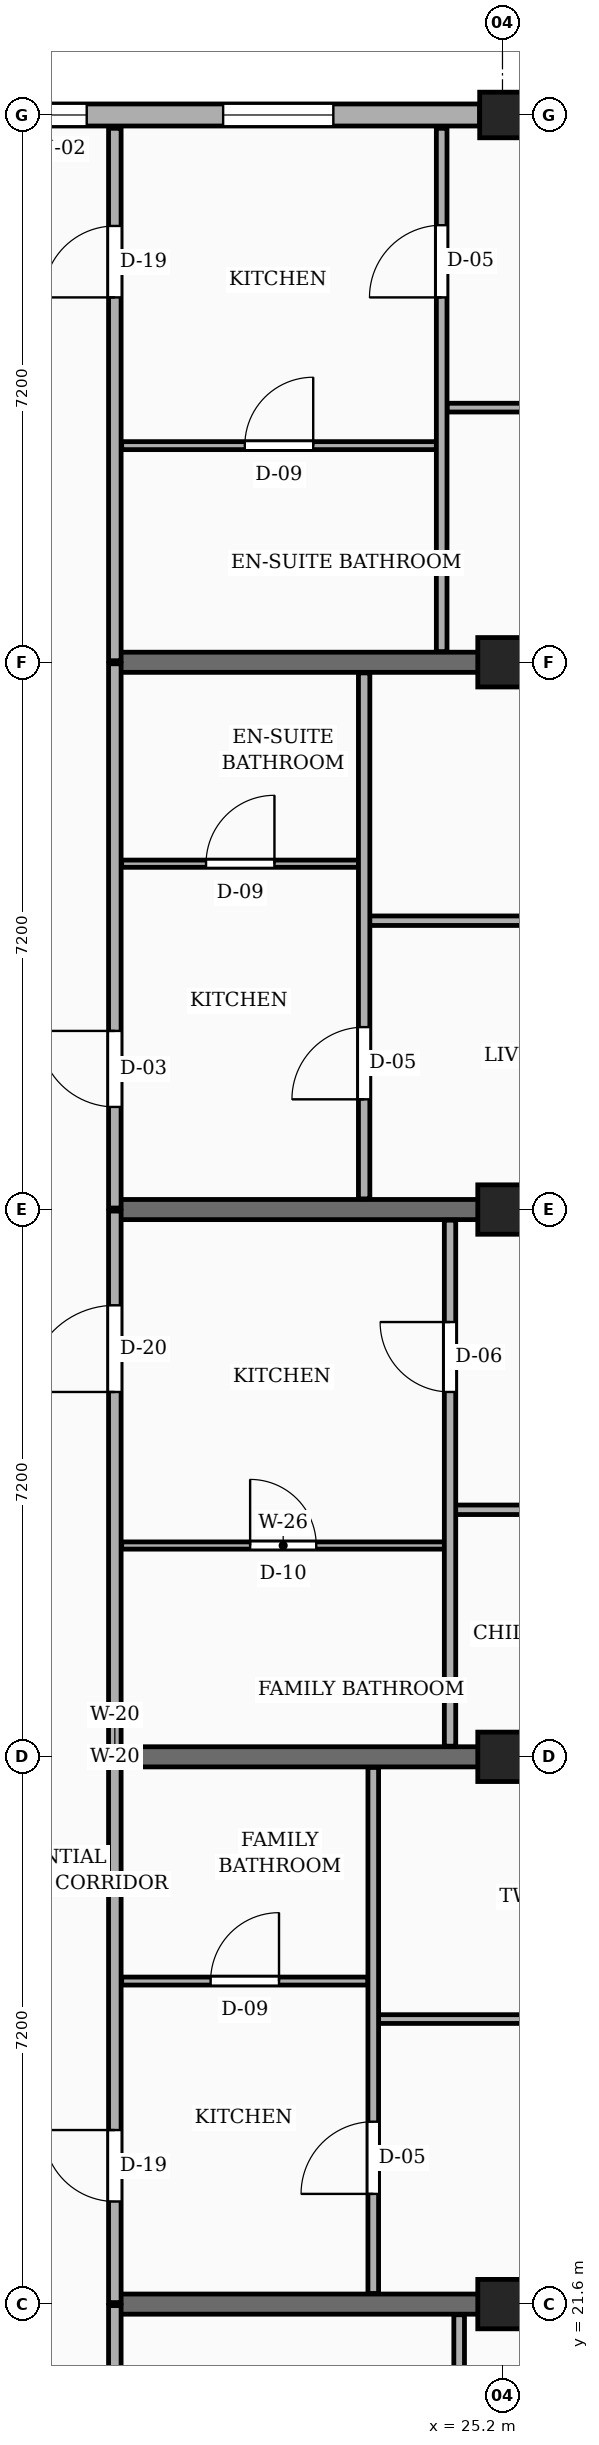
"""IFC4 building model, lengths in metres.
Left out: names, types, materials, properties, quantities, classifications, styles, units other than length and angle.
Written with IfcOpenShell. Run it as: python <this file> out.ifc"""

import sys

from ifc_helpers import new_model, si_unit, direction, frame, frame_2d, origin, origin_2d, place, context, subcontext, project, spatial, rectangle, extrude, element, fill, save


model = new_model("IFC4")
c1 = context("Model", 3, precision=1e-05, world=origin(), true_north=direction((0.0, 1.0)))
c2 = subcontext(c1, "Body", "Model", "MODEL_VIEW")
j1 = project(units=[si_unit("LENGTHUNIT", "METRE"), si_unit("PLANEANGLEUNIT", "RADIAN")], contexts=[c1])
p1 = place(None, origin())
s1 = spatial("IfcSite", under=j1, at=p1, CompositionType="ELEMENT")
p2 = place(p1, origin())
s2 = spatial("IfcBuilding", under=s1, at=p2, CompositionType="ELEMENT")
p3 = place(p2, frame((0.0, 0.0, 4.5)))
s3 = spatial("IfcBuildingStorey", under=s2, at=p3, CompositionType="ELEMENT", Elevation=4.5)
for number, where, z_axis, x_axis in (
    (1, (25.2, 21.6, 0.0), (0.0, 0.0, 1.0), (1.0, 0.0, 0.0)),
    (2, (25.2, 28.8, 0.0), (0.0, 0.0, 1.0), (1.0, 0.0, 0.0)),
    (3, (25.2, 36.0, 0.0), (0.0, 0.0, 1.0), (1.0, 0.0, 0.0)),
    (4, (25.2, 43.2, 0.0), (0.0, 0.0, 1.0), (1.0, 0.0, 0.0)),
):
    element("IfcColumn", number, at=place(p3, frame(where, z_axis=z_axis, x_axis=x_axis)), inside=s3, PredefinedType="COLUMN", context=c2, shape_type="SweptSolid", body=[
        extrude(rectangle(XDim=0.65, YDim=0.65, at=origin_2d()), origin(), (0.0, 0.0, 1.0), 3.15),
    ])
p4 = place(p3, frame((25.2, 50.4, 0.0), z_axis=(0.0, 0.0, 1.0), x_axis=(1.0, 0.0, 0.0)))
e5 = element("IfcColumn", 5, at=p4, inside=s3, PredefinedType="COLUMN", context=c2, shape_type="SweptSolid", body=[
    extrude(rectangle(XDim=0.6, YDim=0.6, at=origin_2d()), origin(), (0.0, 0.0, 1.0), 3.15),
])
for number, where, z_axis, x_axis in (
    (6, (20.1, 21.6, 0.0), (0.0, 0.0, 1.0), (1.0, 0.0, 0.0)),
    (7, (20.1, 28.8, 0.0), (0.0, 0.0, 1.0), (1.0, 0.0, 0.0)),
    (8, (20.1, 36.0, 0.0), (0.0, 0.0, 1.0), (1.0, 0.0, 0.0)),
    (9, (20.1, 43.2, 0.0), (0.0, 0.0, 1.0), (1.0, 0.0, 0.0)),
):
    element("IfcWall", number, at=place(p3, frame(where, z_axis=z_axis, x_axis=x_axis)), inside=s3, PredefinedType="SOLIDWALL", context=c2, shape_type="SweptSolid", body=[
        extrude(rectangle(XDim=12.0, YDim=0.265, at=frame_2d((6.0, 0.0))), origin(), (0.0, 0.0, 1.0), 2.17),
    ])
p5 = place(p3, frame((24.9, 50.4, 0.0), z_axis=(0.0, 0.0, 1.0), x_axis=(-1.0, 0.0, 0.0)))
e10 = element("IfcWall", 10, at=p5, inside=s3, PredefinedType="SOLIDWALL", context=c2, shape_type="SweptSolid", body=[
    extrude(rectangle(XDim=6.6, YDim=0.29, at=frame_2d((3.3, 0.0))), origin(), (0.0, 0.0, 1.0), 2.44),
])
p6 = place(p5, frame((1.925, 0.0, 0.78)))
e11 = element("IfcOpeningElement", 11, at=p6, cuts=e10, PredefinedType="OPENING", context=c2, shape_type="SweptSolid", body=[
    extrude(rectangle(XDim=1.45, YDim=1.44, at=frame_2d((0.725, 0.72))), frame((0.0, 0.155, 0.0), z_axis=(0.0, -1.0, 0.0), x_axis=(1.0, 0.0, 0.0)), (0.0, 0.0, 1.0), 0.31),
])
p7 = place(p5, frame((5.17, 0.0, 0.78)))
e12 = element("IfcOpeningElement", 12, at=p7, cuts=e10, PredefinedType="OPENING", context=c2, shape_type="SweptSolid", body=[
    extrude(rectangle(XDim=0.92, YDim=1.15, at=frame_2d((0.46, 0.575))), frame((0.0, 0.155, 0.0), z_axis=(0.0, -1.0, 0.0), x_axis=(1.0, 0.0, 0.0)), (0.0, 0.0, 1.0), 0.31),
])
p8 = place(p3, frame((20.1, 14.42, 0.0), z_axis=(0.0, 0.0, 1.0), x_axis=(0.0, 1.0, 0.0)))
e13 = element("IfcWall", 13, at=p8, inside=s3, PredefinedType="PARTITIONING", context=c2, shape_type="SweptSolid", body=[
    extrude(rectangle(XDim=7.16, YDim=0.165, at=frame_2d((3.58, 0.0))), origin(), (0.0, 0.0, 1.0), 2.305),
])
p9 = place(p8, frame((4.78, 0.0, 0.0)))
e14 = element("IfcOpeningElement", 14, at=p9, cuts=e13, PredefinedType="OPENING", context=c2, shape_type="SweptSolid", body=[
    extrude(rectangle(XDim=1.0, YDim=2.15, at=frame_2d((0.5, 1.075))), frame((0.0, 0.093, 0.0), z_axis=(0.0, -1.0, 0.0), x_axis=(1.0, 0.0, 0.0)), (0.0, 0.0, 1.0), 0.185),
])
p10 = place(p3, frame((20.1, 21.62, 0.0), z_axis=(0.0, 0.0, 1.0), x_axis=(0.0, 1.0, 0.0)))
e15 = element("IfcWall", 15, at=p10, inside=s3, PredefinedType="PARTITIONING", context=c2, shape_type="SweptSolid", body=[
    extrude(rectangle(XDim=7.16, YDim=0.165, at=frame_2d((3.58, 0.0))), origin(), (0.0, 0.0, 1.0), 2.305),
])
p11 = place(p10, frame((1.33, 0.0, 0.0)))
e16 = element("IfcOpeningElement", 16, at=p11, cuts=e15, PredefinedType="OPENING", context=c2, shape_type="SweptSolid", body=[
    extrude(rectangle(XDim=0.94, YDim=2.12, at=frame_2d((0.47, 1.06))), frame((0.0, 0.093, 0.0), z_axis=(0.0, -1.0, 0.0), x_axis=(1.0, 0.0, 0.0)), (0.0, 0.0, 1.0), 0.185),
])
p12 = place(p3, frame((20.1, 28.82, 0.0), z_axis=(0.0, 0.0, 1.0), x_axis=(0.0, 1.0, 0.0)))
e17 = element("IfcWall", 17, at=p12, inside=s3, PredefinedType="PARTITIONING", context=c2, shape_type="SweptSolid", body=[
    extrude(rectangle(XDim=7.16, YDim=0.165, at=frame_2d((3.58, 0.0))), origin(), (0.0, 0.0, 1.0), 2.305),
])
p13 = place(p12, frame((4.78, 0.0, 0.0)))
e18 = element("IfcOpeningElement", 18, at=p13, cuts=e17, PredefinedType="OPENING", context=c2, shape_type="SweptSolid", body=[
    extrude(rectangle(XDim=1.14, YDim=2.18, at=frame_2d((0.57, 1.09))), frame((0.0, 0.093, 0.0), z_axis=(0.0, -1.0, 0.0), x_axis=(1.0, 0.0, 0.0)), (0.0, 0.0, 1.0), 0.185),
])
p14 = place(p3, frame((20.1, 36.02, 0.0), z_axis=(0.0, 0.0, 1.0), x_axis=(0.0, 1.0, 0.0)))
e19 = element("IfcWall", 19, at=p14, inside=s3, PredefinedType="PARTITIONING", context=c2, shape_type="SweptSolid", body=[
    extrude(rectangle(XDim=7.16, YDim=0.165, at=frame_2d((3.58, 0.0))), origin(), (0.0, 0.0, 1.0), 2.305),
])
p15 = place(p14, frame((1.33, 0.0, 0.0)))
e20 = element("IfcOpeningElement", 20, at=p15, cuts=e19, PredefinedType="OPENING", context=c2, shape_type="SweptSolid", body=[
    extrude(rectangle(XDim=1.0, YDim=2.15, at=frame_2d((0.5, 1.075))), frame((0.0, 0.093, 0.0), z_axis=(0.0, -1.0, 0.0), x_axis=(1.0, 0.0, 0.0)), (0.0, 0.0, 1.0), 0.185),
])
p16 = place(p3, frame((20.1, 43.22, 0.0), z_axis=(0.0, 0.0, 1.0), x_axis=(0.0, 1.0, 0.0)))
e21 = element("IfcWall", 21, at=p16, inside=s3, PredefinedType="PARTITIONING", context=c2, shape_type="SweptSolid", body=[
    extrude(rectangle(XDim=7.005, YDim=0.165, at=frame_2d((3.502, 0.0))), origin(), (0.0, 0.0, 1.0), 2.305),
])
p17 = place(p16, frame((4.78, 0.0, 0.0)))
e22 = element("IfcOpeningElement", 22, at=p17, cuts=e21, PredefinedType="OPENING", context=c2, shape_type="SweptSolid", body=[
    extrude(rectangle(XDim=0.94, YDim=2.12, at=frame_2d((0.47, 1.06))), frame((0.0, 0.093, 0.0), z_axis=(0.0, -1.0, 0.0), x_axis=(1.0, 0.0, 0.0)), (0.0, 0.0, 1.0), 0.185),
])
p18 = place(p3, frame((24.63, 14.54, 0.0), z_axis=(0.0, 0.0, 1.0), x_axis=(0.0, 1.0, 0.0)))
e23 = element("IfcWall", 23, at=p18, inside=s3, PredefinedType="PARTITIONING", context=c2, shape_type="SweptSolid", body=[
    extrude(rectangle(XDim=6.92, YDim=0.14, at=frame_2d((3.46, 0.0))), origin(), (0.0, 0.0, 1.0), 2.305),
])
p19 = place(p18, frame((4.66, 0.0, 0.0)))
e24 = element("IfcOpeningElement", 24, at=p19, cuts=e23, PredefinedType="OPENING", context=c2, shape_type="SweptSolid", body=[
    extrude(rectangle(XDim=0.92, YDim=2.1, at=frame_2d((0.46, 1.05))), frame((0.0, 0.08, 0.0), z_axis=(0.0, -1.0, 0.0), x_axis=(1.0, 0.0, 0.0)), (0.0, 0.0, 1.0), 0.16),
])
p20 = place(p3, frame((23.57, 25.35, 0.0), z_axis=(0.0, 0.0, 1.0), x_axis=(1.0, 0.0, 0.0)))
e25 = element("IfcWall", 25, at=p20, inside=s3, PredefinedType="PARTITIONING", context=c2, shape_type="SweptSolid", body=[
    extrude(rectangle(XDim=8.655, YDim=0.115, at=frame_2d((4.328, 0.0))), origin(), (0.0, 0.0, 1.0), 2.305),
])
p21 = place(p20, frame((3.877, 0.0, 0.0)))
e26 = element("IfcOpeningElement", 26, at=p21, cuts=e25, PredefinedType="OPENING", context=c2, shape_type="SweptSolid", body=[
    extrude(rectangle(XDim=0.9, YDim=2.1, at=frame_2d((0.45, 1.05))), frame((0.0, 0.067, 0.0), z_axis=(0.0, -1.0, 0.0), x_axis=(1.0, 0.0, 0.0)), (0.0, 0.0, 1.0), 0.135),
])
p22 = place(p3, frame((20.19, 25.85, 0.0), z_axis=(0.0, 0.0, 1.0), x_axis=(1.0, 0.0, 0.0)))
e27 = element("IfcWall", 27, at=p22, inside=s3, PredefinedType="PARTITIONING", context=c2, shape_type="SweptSolid", body=[
    extrude(rectangle(XDim=3.24, YDim=0.105, at=frame_2d((1.62, 0.0))), origin(), (0.0, 0.0, 1.0), 2.305),
])
p23 = place(p22, frame((1.17, 0.0, 0.0)))
e28 = element("IfcOpeningElement", 28, at=p23, cuts=e27, PredefinedType="OPENING", context=c2, shape_type="SweptSolid", body=[
    extrude(rectangle(XDim=0.9, YDim=2.05, at=frame_2d((0.45, 1.025))), frame((0.0, 0.062, 0.0), z_axis=(0.0, -1.0, 0.0), x_axis=(1.0, 0.0, 0.0)), (0.0, 0.0, 1.0), 0.125),
])
p24 = place(p3, frame((23.5, 21.74, 0.0), z_axis=(0.0, 0.0, 1.0), x_axis=(0.0, 1.0, 0.0)))
e29 = element("IfcWall", 29, at=p24, inside=s3, PredefinedType="PARTITIONING", context=c2, shape_type="SweptSolid", body=[
    extrude(rectangle(XDim=6.92, YDim=0.14, at=frame_2d((3.46, 0.0))), origin(), (0.0, 0.0, 1.0), 2.305),
])
p25 = place(p24, frame((1.31, 0.0, 0.0)))
e30 = element("IfcOpeningElement", 30, at=p25, cuts=e29, PredefinedType="OPENING", context=c2, shape_type="SweptSolid", body=[
    extrude(rectangle(XDim=0.95, YDim=2.1, at=frame_2d((0.475, 1.05))), frame((0.0, 0.08, 0.0), z_axis=(0.0, -1.0, 0.0), x_axis=(1.0, 0.0, 0.0)), (0.0, 0.0, 1.0), 0.16),
])
p26 = place(p3, frame((24.58, 32.05, 0.0), z_axis=(0.0, 0.0, 1.0), x_axis=(1.0, 0.0, 0.0)))
e31 = element("IfcWall", 31, at=p26, inside=s3, PredefinedType="PARTITIONING", context=c2, shape_type="SweptSolid", body=[
    extrude(rectangle(XDim=7.645, YDim=0.125, at=frame_2d((3.823, 0.0))), origin(), (0.0, 0.0, 1.0), 2.305),
])
p27 = place(p26, frame((3.383, 0.0, 0.0)))
e32 = element("IfcOpeningElement", 32, at=p27, cuts=e31, PredefinedType="OPENING", context=c2, shape_type="SweptSolid", body=[
    extrude(rectangle(XDim=0.88, YDim=2.08, at=frame_2d((0.44, 1.04))), frame((0.0, 0.073, 0.0), z_axis=(0.0, -1.0, 0.0), x_axis=(1.0, 0.0, 0.0)), (0.0, 0.0, 1.0), 0.145),
])
p28 = place(p3, frame((20.19, 31.58, 0.0), z_axis=(0.0, 0.0, 1.0), x_axis=(1.0, 0.0, 0.0)))
e33 = element("IfcWall", 33, at=p28, inside=s3, PredefinedType="PARTITIONING", context=c2, shape_type="SweptSolid", body=[
    extrude(rectangle(XDim=4.25, YDim=0.095, at=frame_2d((2.125, 0.0))), origin(), (0.0, 0.0, 1.0), 2.305),
])
p29 = place(p28, frame((1.69, 0.0, 0.0)))
e34 = element("IfcOpeningElement", 34, at=p29, cuts=e33, PredefinedType="OPENING", context=c2, shape_type="SweptSolid", body=[
    extrude(rectangle(XDim=0.87, YDim=2.05, at=frame_2d((0.435, 1.025))), frame((0.0, 0.058, 0.0), z_axis=(0.0, -1.0, 0.0), x_axis=(1.0, 0.0, 0.0)), (0.0, 0.0, 1.0), 0.115),
])
p30 = place(p3, frame((24.51, 28.94, 0.0), z_axis=(0.0, 0.0, 1.0), x_axis=(0.0, 1.0, 0.0)))
e35 = element("IfcWall", 35, at=p30, inside=s3, PredefinedType="PARTITIONING", context=c2, shape_type="SweptSolid", body=[
    extrude(rectangle(XDim=6.92, YDim=0.15, at=frame_2d((3.46, 0.0))), origin(), (0.0, 0.0, 1.0), 2.305),
])
p31 = place(p30, frame((4.66, 0.0, 0.0)))
e36 = element("IfcOpeningElement", 36, at=p31, cuts=e35, PredefinedType="OPENING", context=c2, shape_type="SweptSolid", body=[
    extrude(rectangle(XDim=0.92, YDim=2.1, at=frame_2d((0.46, 1.05))), frame((0.0, 0.085, 0.0), z_axis=(0.0, -1.0, 0.0), x_axis=(1.0, 0.0, 0.0)), (0.0, 0.0, 1.0), 0.17),
])
p32 = place(p3, frame((23.45, 39.8, 0.0), z_axis=(0.0, 0.0, 1.0), x_axis=(1.0, 0.0, 0.0)))
e37 = element("IfcWall", 37, at=p32, inside=s3, PredefinedType="PARTITIONING", context=c2, shape_type="SweptSolid", body=[
    extrude(rectangle(XDim=8.775, YDim=0.125, at=frame_2d((4.388, 0.0))), origin(), (0.0, 0.0, 1.0), 2.305),
])
p33 = place(p32, frame((3.938, 0.0, 0.0)))
e38 = element("IfcOpeningElement", 38, at=p33, cuts=e37, PredefinedType="OPENING", context=c2, shape_type="SweptSolid", body=[
    extrude(rectangle(XDim=0.9, YDim=2.1, at=frame_2d((0.45, 1.05))), frame((0.0, 0.073, 0.0), z_axis=(0.0, -1.0, 0.0), x_axis=(1.0, 0.0, 0.0)), (0.0, 0.0, 1.0), 0.145),
])
p34 = place(p3, frame((20.19, 40.55, 0.0), z_axis=(0.0, 0.0, 1.0), x_axis=(1.0, 0.0, 0.0)))
e39 = element("IfcWall", 39, at=p34, inside=s3, PredefinedType="PARTITIONING", context=c2, shape_type="SweptSolid", body=[
    extrude(rectangle(XDim=3.12, YDim=0.095, at=frame_2d((1.56, 0.0))), origin(), (0.0, 0.0, 1.0), 2.305),
])
p35 = place(p34, frame((1.11, 0.0, 0.0)))
e40 = element("IfcOpeningElement", 40, at=p35, cuts=e39, PredefinedType="OPENING", context=c2, shape_type="SweptSolid", body=[
    extrude(rectangle(XDim=0.9, YDim=2.05, at=frame_2d((0.45, 1.025))), frame((0.0, 0.058, 0.0), z_axis=(0.0, -1.0, 0.0), x_axis=(1.0, 0.0, 0.0)), (0.0, 0.0, 1.0), 0.115),
])
p36 = place(p3, frame((23.38, 36.14, 0.0), z_axis=(0.0, 0.0, 1.0), x_axis=(0.0, 1.0, 0.0)))
e41 = element("IfcWall", 41, at=p36, inside=s3, PredefinedType="PARTITIONING", context=c2, shape_type="SweptSolid", body=[
    extrude(rectangle(XDim=6.92, YDim=0.15, at=frame_2d((3.46, 0.0))), origin(), (0.0, 0.0, 1.0), 2.305),
])
p37 = place(p36, frame((1.31, 0.0, 0.0)))
e42 = element("IfcOpeningElement", 42, at=p37, cuts=e41, PredefinedType="OPENING", context=c2, shape_type="SweptSolid", body=[
    extrude(rectangle(XDim=0.95, YDim=2.1, at=frame_2d((0.475, 1.05))), frame((0.0, 0.085, 0.0), z_axis=(0.0, -1.0, 0.0), x_axis=(1.0, 0.0, 0.0)), (0.0, 0.0, 1.0), 0.17),
])
p38 = place(p3, frame((24.47, 46.55, 0.0), z_axis=(0.0, 0.0, 1.0), x_axis=(1.0, 0.0, 0.0)))
e43 = element("IfcWall", 43, at=p38, inside=s3, PredefinedType="PARTITIONING", context=c2, shape_type="SweptSolid", body=[
    extrude(rectangle(XDim=7.755, YDim=0.115, at=frame_2d((3.877, 0.0))), origin(), (0.0, 0.0, 1.0), 2.305),
])
p39 = place(p38, frame((3.427, 0.0, 0.0)))
e44 = element("IfcOpeningElement", 44, at=p39, cuts=e43, PredefinedType="OPENING", context=c2, shape_type="SweptSolid", body=[
    extrude(rectangle(XDim=0.9, YDim=2.1, at=frame_2d((0.45, 1.05))), frame((0.0, 0.067, 0.0), z_axis=(0.0, -1.0, 0.0), x_axis=(1.0, 0.0, 0.0)), (0.0, 0.0, 1.0), 0.135),
])
p40 = place(p3, frame((20.19, 46.05, 0.0), z_axis=(0.0, 0.0, 1.0), x_axis=(1.0, 0.0, 0.0)))
e45 = element("IfcWall", 45, at=p40, inside=s3, PredefinedType="PARTITIONING", context=c2, shape_type="SweptSolid", body=[
    extrude(rectangle(XDim=4.14, YDim=0.105, at=frame_2d((2.07, 0.0))), origin(), (0.0, 0.0, 1.0), 2.305),
])
p41 = place(p40, frame((1.62, 0.0, 0.0)))
e46 = element("IfcOpeningElement", 46, at=p41, cuts=e45, PredefinedType="OPENING", context=c2, shape_type="SweptSolid", body=[
    extrude(rectangle(XDim=0.9, YDim=2.05, at=frame_2d((0.45, 1.025))), frame((0.0, 0.062, 0.0), z_axis=(0.0, -1.0, 0.0), x_axis=(1.0, 0.0, 0.0)), (0.0, 0.0, 1.0), 0.125),
])
p42 = place(p3, frame((24.4, 43.34, 0.0), z_axis=(0.0, 0.0, 1.0), x_axis=(0.0, 1.0, 0.0)))
e47 = element("IfcWall", 47, at=p42, inside=s3, PredefinedType="PARTITIONING", context=c2, shape_type="SweptSolid", body=[
    extrude(rectangle(XDim=6.885, YDim=0.14, at=frame_2d((3.442, 0.0))), origin(), (0.0, 0.0, 1.0), 2.305),
])
p43 = place(p42, frame((4.66, 0.0, 0.0)))
e48 = element("IfcOpeningElement", 48, at=p43, cuts=e47, PredefinedType="OPENING", context=c2, shape_type="SweptSolid", body=[
    extrude(rectangle(XDim=0.95, YDim=2.1, at=frame_2d((0.475, 1.05))), frame((0.0, 0.08, 0.0), z_axis=(0.0, -1.0, 0.0), x_axis=(1.0, 0.0, 0.0)), (0.0, 0.0, 1.0), 0.16),
])
p44 = place(p6, origin())
e49 = element("IfcWindow", 49, at=p44, inside=s3, PartitioningType="SINGLE_PANEL", PredefinedType="WINDOW", context=c2, shape_type="SweptSolid", body=[
    extrude(rectangle(XDim=1.45, YDim=1.44, at=frame_2d((0.725, 0.72))), frame((0.0, 0.03, 0.0), z_axis=(0.0, -1.0, 0.0), x_axis=(1.0, 0.0, 0.0)), (0.0, 0.0, 1.0), 0.06),
])
fill(e11, e49)
p45 = place(p7, origin())
e50 = element("IfcWindow", 50, at=p45, inside=s3, PartitioningType="SINGLE_PANEL", PredefinedType="WINDOW", context=c2, shape_type="SweptSolid", body=[
    extrude(rectangle(XDim=0.92, YDim=1.15, at=frame_2d((0.46, 0.575))), frame((0.0, 0.03, 0.0), z_axis=(0.0, -1.0, 0.0), x_axis=(1.0, 0.0, 0.0)), (0.0, 0.0, 1.0), 0.06),
])
fill(e12, e50)
p46 = place(p11, origin())
e51 = element("IfcDoor", 51, at=p46, inside=s3, OperationType="SINGLE_SWING_RIGHT", PredefinedType="DOOR", context=c2, shape_type="SweptSolid", body=[
    extrude(rectangle(XDim=0.94, YDim=2.12, at=frame_2d((0.47, 1.06))), frame((0.0, 0.025, 0.0), z_axis=(0.0, -1.0, 0.0), x_axis=(1.0, 0.0, 0.0)), (0.0, 0.0, 1.0), 0.05),
])
fill(e16, e51)
p47 = place(p13, origin())
e52 = element("IfcDoor", 52, at=p47, inside=s3, OperationType="SINGLE_SWING_LEFT", PredefinedType="DOOR", context=c2, shape_type="SweptSolid", body=[
    extrude(rectangle(XDim=1.14, YDim=2.18, at=frame_2d((0.57, 1.09))), frame((0.0, 0.025, 0.0), z_axis=(0.0, -1.0, 0.0), x_axis=(1.0, 0.0, 0.0)), (0.0, 0.0, 1.0), 0.05),
])
fill(e18, e52)
p48 = place(p15, origin())
e53 = element("IfcDoor", 53, at=p48, inside=s3, OperationType="SINGLE_SWING_RIGHT", PredefinedType="DOOR", context=c2, shape_type="SweptSolid", body=[
    extrude(rectangle(XDim=1.0, YDim=2.15, at=frame_2d((0.5, 1.075))), frame((0.0, 0.025, 0.0), z_axis=(0.0, -1.0, 0.0), x_axis=(1.0, 0.0, 0.0)), (0.0, 0.0, 1.0), 0.05),
])
fill(e20, e53)
p49 = place(p17, origin())
e54 = element("IfcDoor", 54, at=p49, inside=s3, OperationType="SINGLE_SWING_LEFT", PredefinedType="DOOR", context=c2, shape_type="SweptSolid", body=[
    extrude(rectangle(XDim=0.94, YDim=2.12, at=frame_2d((0.47, 1.06))), frame((0.0, 0.025, 0.0), z_axis=(0.0, -1.0, 0.0), x_axis=(1.0, 0.0, 0.0)), (0.0, 0.0, 1.0), 0.05),
])
fill(e22, e54)
p50 = place(p23, origin())
e55 = element("IfcDoor", 55, at=p50, inside=s3, OperationType="SINGLE_SWING_RIGHT", PredefinedType="DOOR", context=c2, shape_type="SweptSolid", body=[
    extrude(rectangle(XDim=0.9, YDim=2.05, at=frame_2d((0.45, 1.025))), frame((0.0, 0.025, 0.0), z_axis=(0.0, -1.0, 0.0), x_axis=(1.0, 0.0, 0.0)), (0.0, 0.0, 1.0), 0.05),
])
fill(e28, e55)
p51 = place(p25, origin())
e56 = element("IfcDoor", 56, at=p51, inside=s3, OperationType="SINGLE_SWING_LEFT", PredefinedType="DOOR", context=c2, shape_type="SweptSolid", body=[
    extrude(rectangle(XDim=0.95, YDim=2.1, at=frame_2d((0.475, 1.05))), frame((0.0, 0.025, 0.0), z_axis=(0.0, -1.0, 0.0), x_axis=(1.0, 0.0, 0.0)), (0.0, 0.0, 1.0), 0.05),
])
fill(e30, e56)
p52 = place(p29, origin())
e57 = element("IfcDoor", 57, at=p52, inside=s3, OperationType="SINGLE_SWING_LEFT", PredefinedType="DOOR", context=c2, shape_type="SweptSolid", body=[
    extrude(rectangle(XDim=0.87, YDim=2.05, at=frame_2d((0.435, 1.025))), frame((0.0, 0.025, 0.0), z_axis=(0.0, -1.0, 0.0), x_axis=(1.0, 0.0, 0.0)), (0.0, 0.0, 1.0), 0.05),
])
fill(e34, e57)
p53 = place(p31, origin())
e58 = element("IfcDoor", 58, at=p53, inside=s3, OperationType="SINGLE_SWING_RIGHT", PredefinedType="DOOR", context=c2, shape_type="SweptSolid", body=[
    extrude(rectangle(XDim=0.92, YDim=2.1, at=frame_2d((0.46, 1.05))), frame((0.0, 0.025, 0.0), z_axis=(0.0, -1.0, 0.0), x_axis=(1.0, 0.0, 0.0)), (0.0, 0.0, 1.0), 0.05),
])
fill(e36, e58)
p54 = place(p35, origin())
e59 = element("IfcDoor", 59, at=p54, inside=s3, OperationType="SINGLE_SWING_RIGHT", PredefinedType="DOOR", context=c2, shape_type="SweptSolid", body=[
    extrude(rectangle(XDim=0.9, YDim=2.05, at=frame_2d((0.45, 1.025))), frame((0.0, 0.025, 0.0), z_axis=(0.0, -1.0, 0.0), x_axis=(1.0, 0.0, 0.0)), (0.0, 0.0, 1.0), 0.05),
])
fill(e40, e59)
p55 = place(p37, origin())
e60 = element("IfcDoor", 60, at=p55, inside=s3, OperationType="SINGLE_SWING_LEFT", PredefinedType="DOOR", context=c2, shape_type="SweptSolid", body=[
    extrude(rectangle(XDim=0.95, YDim=2.1, at=frame_2d((0.475, 1.05))), frame((0.0, 0.025, 0.0), z_axis=(0.0, -1.0, 0.0), x_axis=(1.0, 0.0, 0.0)), (0.0, 0.0, 1.0), 0.05),
])
fill(e42, e60)
p56 = place(p41, origin())
e61 = element("IfcDoor", 61, at=p56, inside=s3, OperationType="SINGLE_SWING_RIGHT", PredefinedType="DOOR", context=c2, shape_type="SweptSolid", body=[
    extrude(rectangle(XDim=0.9, YDim=2.05, at=frame_2d((0.45, 1.025))), frame((0.0, 0.025, 0.0), z_axis=(0.0, -1.0, 0.0), x_axis=(1.0, 0.0, 0.0)), (0.0, 0.0, 1.0), 0.05),
])
fill(e46, e61)
p57 = place(p43, origin())
e62 = element("IfcDoor", 62, at=p57, inside=s3, OperationType="SINGLE_SWING_LEFT", PredefinedType="DOOR", context=c2, shape_type="SweptSolid", body=[
    extrude(rectangle(XDim=0.95, YDim=2.1, at=frame_2d((0.475, 1.05))), frame((0.0, 0.025, 0.0), z_axis=(0.0, -1.0, 0.0), x_axis=(1.0, 0.0, 0.0)), (0.0, 0.0, 1.0), 0.05),
])
fill(e48, e62)
save(model, sys.argv[1])
